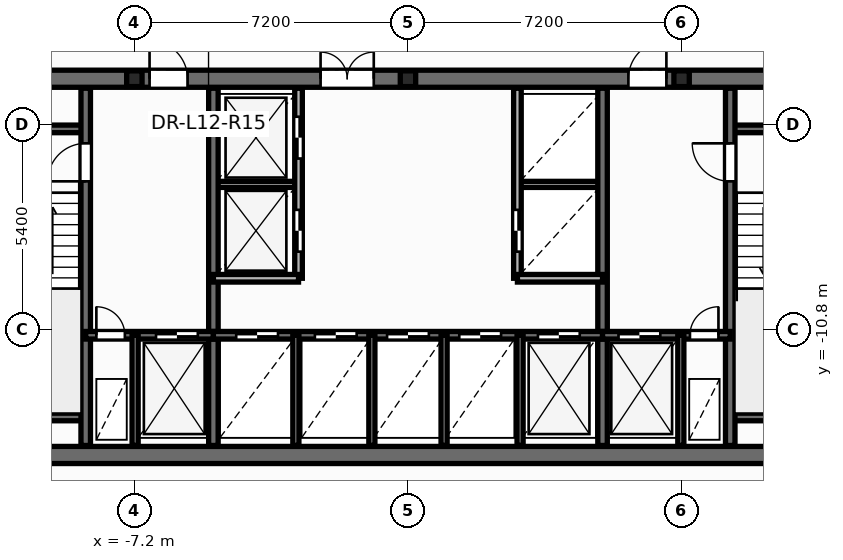
"""IFC4 building model, lengths in metres.
Left out: names, types, materials, properties, quantities, classifications, styles, units other than length and angle.
Written with IfcOpenShell. Run it as: python <this file> out.ifc"""

import sys

from ifc_helpers import new_model, si_unit, direction, frame, frame_2d, origin, origin_2d, place, context, subcontext, project, spatial, rectangle, i_section, extrude, element, fill, save


model = new_model("IFC4")
c1 = context("Model", 3, precision=1e-05, world=origin(), true_north=direction((0.0, 1.0)))
c2 = subcontext(c1, "Body", "Model", "MODEL_VIEW")
j1 = project(units=[si_unit("LENGTHUNIT", "METRE"), si_unit("PLANEANGLEUNIT", "RADIAN")], contexts=[c1])
p1 = place(None, origin())
s1 = spatial("IfcSite", under=j1, at=p1, CompositionType="ELEMENT")
p2 = place(p1, origin())
s2 = spatial("IfcBuilding", under=s1, at=p2, CompositionType="ELEMENT")
p3 = place(p2, frame((0.0, 0.0, 49.5)))
s3 = spatial("IfcBuildingStorey", under=s2, at=p3, CompositionType="ELEMENT", Elevation=49.5)
for number, where, z_axis, x_axis in (
    (1, (-7.2, -4.2, 0.0), (0.0, 0.0, 1.0), (1.0, 0.0, 0.0)),
    (2, (0.0, -4.2, 0.0), (0.0, 0.0, 1.0), (1.0, 0.0, 0.0)),
    (3, (7.2, -4.2, 0.0), (0.0, 0.0, 1.0), (1.0, 0.0, 0.0)),
):
    element("IfcColumn", number, at=place(p3, frame(where, z_axis=z_axis, x_axis=x_axis)), inside=s3, PredefinedType="PILASTER", context=c2, shape_type="SweptSolid", body=[
        extrude(i_section(OverallWidth=0.405, OverallDepth=0.414, WebThickness=0.022, FlangeThickness=0.032, at=origin_2d()), origin(), (0.0, 0.0, 1.0), 3.6),
    ])
for number, where, z_axis, x_axis in (
    (4, (-5.12, -6.98, 0.0), (0.0, 0.0, 1.0), (1.0, 0.0, 0.0)),
    (5, (2.88, -6.98, 0.0), (0.0, 0.0, 1.0), (1.0, 0.0, 0.0)),
):
    element("IfcWall", number, at=place(p3, frame(where, z_axis=z_axis, x_axis=x_axis)), inside=s3, PredefinedType="PARTITIONING", context=c2, shape_type="SweptSolid", body=[
        extrude(rectangle(XDim=2.24, YDim=0.16, at=frame_2d((1.12, 0.0))), origin(), (0.0, 0.0, 1.0), 3.35),
    ])
p4 = place(p3, frame((-12.65, -14.1, 0.0), z_axis=(0.0, 0.0, 1.0), x_axis=(1.0, 0.0, 0.0)))
e6 = element("IfcWall", 6, at=p4, inside=s3, PredefinedType="SHEAR", context=c2, shape_type="SweptSolid", body=[
    extrude(rectangle(XDim=25.3, YDim=0.45, at=frame_2d((12.65, 0.0))), origin(), (0.0, 0.0, 1.0), 3.6),
])
p5 = place(p3, frame((-12.65, -4.2, 0.0), z_axis=(0.0, 0.0, 1.0), x_axis=(1.0, 0.0, 0.0)))
e7 = element("IfcWall", 7, at=p5, inside=s3, PredefinedType="SHEAR", context=c2, shape_type="SweptSolid", body=[
    extrude(rectangle(XDim=25.3, YDim=0.45, at=frame_2d((12.65, 0.0))), origin(), (0.0, 0.0, 1.0), 3.6),
])
p6 = place(p5, frame((1.85, 0.0, 0.0)))
e8 = element("IfcOpeningElement", 8, at=p6, cuts=e7, PredefinedType="OPENING", context=c2, shape_type="SweptSolid", body=[
    extrude(rectangle(XDim=0.756, YDim=2.054, at=frame_2d((0.375, 1.027))), frame((0.0, 0.235, 0.0), z_axis=(0.0, -1.0, 0.0), x_axis=(1.0, 0.0, 0.0)), (0.0, 0.0, 1.0), 0.47),
])
p7 = place(p5, frame((22.65, 0.0, 0.0)))
e9 = element("IfcOpeningElement", 9, at=p7, cuts=e7, PredefinedType="OPENING", context=c2, shape_type="SweptSolid", body=[
    extrude(rectangle(XDim=0.756, YDim=2.054, at=frame_2d((0.375, 1.027))), frame((0.0, 0.235, 0.0), z_axis=(0.0, -1.0, 0.0), x_axis=(1.0, 0.0, 0.0)), (0.0, 0.0, 1.0), 0.47),
])
p8 = place(p5, frame((5.85, 0.0, 0.0)))
e10 = element("IfcOpeningElement", 10, at=p8, cuts=e7, PredefinedType="OPENING", context=c2, shape_type="SweptSolid", body=[
    extrude(rectangle(XDim=1.006, YDim=2.104, at=frame_2d((0.5, 1.052))), frame((0.0, 0.235, 0.0), z_axis=(0.0, -1.0, 0.0), x_axis=(1.0, 0.0, 0.0)), (0.0, 0.0, 1.0), 0.47),
])
p9 = place(p5, frame((10.35, 0.0, 0.0)))
e11 = element("IfcOpeningElement", 11, at=p9, cuts=e7, PredefinedType="OPENING", context=c2, shape_type="SweptSolid", body=[
    extrude(rectangle(XDim=1.406, YDim=2.154, at=frame_2d((0.7, 1.077))), frame((0.0, 0.235, 0.0), z_axis=(0.0, -1.0, 0.0), x_axis=(1.0, 0.0, 0.0)), (0.0, 0.0, 1.0), 0.47),
])
p10 = place(p5, frame((18.45, 0.0, 0.0)))
e12 = element("IfcOpeningElement", 12, at=p10, cuts=e7, PredefinedType="OPENING", context=c2, shape_type="SweptSolid", body=[
    extrude(rectangle(XDim=1.006, YDim=2.104, at=frame_2d((0.5, 1.052))), frame((0.0, 0.235, 0.0), z_axis=(0.0, -1.0, 0.0), x_axis=(1.0, 0.0, 0.0)), (0.0, 0.0, 1.0), 0.47),
])
for number, where, z_axis, x_axis in (
    (13, (-12.35, -5.52, 0.0), (0.0, 0.0, 1.0), (1.0, 0.0, 0.0)),
    (14, (-12.35, -13.1, 0.0), (0.0, 0.0, 1.0), (1.0, 0.0, 0.0)),
    (15, (8.48, -5.52, 0.0), (0.0, 0.0, 1.0), (1.0, 0.0, 0.0)),
    (16, (8.48, -13.1, 0.0), (0.0, 0.0, 1.0), (1.0, 0.0, 0.0)),
):
    element("IfcWall", number, at=place(p3, frame(where, z_axis=z_axis, x_axis=x_axis)), inside=s3, PredefinedType="SOLIDWALL", context=c2, shape_type="SweptSolid", body=[
        extrude(rectangle(XDim=3.87, YDim=0.2, at=frame_2d((1.935, 0.0))), origin(), (0.0, 0.0, 1.0), 3.6),
    ])
p11 = place(p3, frame((-8.48, -13.85, 0.0), z_axis=(0.0, 0.0, 1.0), x_axis=(0.0, 1.0, 0.0)))
e17 = element("IfcWall", 17, at=p11, inside=s3, PredefinedType="SHEAR", context=c2, shape_type="SweptSolid", body=[
    extrude(rectangle(XDim=9.4, YDim=0.25, at=frame_2d((4.7, 0.0))), origin(), (0.0, 0.0, 1.0), 3.6),
])
p12 = place(p11, frame((6.95, 0.0, 0.0)))
e18 = element("IfcOpeningElement", 18, at=p12, cuts=e17, PredefinedType="OPENING", context=c2, shape_type="SweptSolid", body=[
    extrude(rectangle(XDim=1.006, YDim=2.104, at=frame_2d((0.5, 1.052))), frame((0.0, 0.135, 0.0), z_axis=(0.0, -1.0, 0.0), x_axis=(1.0, 0.0, 0.0)), (0.0, 0.0, 1.0), 0.27),
])
p13 = place(p3, frame((8.48, -13.85, 0.0), z_axis=(0.0, 0.0, 1.0), x_axis=(0.0, 1.0, 0.0)))
e19 = element("IfcWall", 19, at=p13, inside=s3, PredefinedType="SHEAR", context=c2, shape_type="SweptSolid", body=[
    extrude(rectangle(XDim=9.4, YDim=0.25, at=frame_2d((4.7, 0.0))), origin(), (0.0, 0.0, 1.0), 3.6),
])
p14 = place(p13, frame((6.95, 0.0, 0.0)))
e20 = element("IfcOpeningElement", 20, at=p14, cuts=e19, PredefinedType="OPENING", context=c2, shape_type="SweptSolid", body=[
    extrude(rectangle(XDim=1.006, YDim=2.104, at=frame_2d((0.5, 1.052))), frame((0.0, 0.135, 0.0), z_axis=(0.0, -1.0, 0.0), x_axis=(1.0, 0.0, 0.0)), (0.0, 0.0, 1.0), 0.27),
])
for number, where, z_axis, x_axis in (
    (21, (-5.12, -13.85, 0.0), (0.0, 0.0, 1.0), (0.0, 1.0, 0.0)),
    (22, (5.12, -13.85, 0.0), (0.0, 0.0, 1.0), (0.0, 1.0, 0.0)),
):
    element("IfcWall", number, at=place(p3, frame(where, z_axis=z_axis, x_axis=x_axis)), inside=s3, PredefinedType="SHEAR", context=c2, shape_type="SweptSolid", body=[
        extrude(rectangle(XDim=9.4, YDim=0.25, at=frame_2d((4.7, 0.0))), origin(), (0.0, 0.0, 1.0), 3.6),
    ])
p15 = place(p3, frame((-8.48, -10.95, 0.0), z_axis=(0.0, 0.0, 1.0), x_axis=(1.0, 0.0, 0.0)))
e23 = element("IfcWall", 23, at=p15, inside=s3, PredefinedType="SOLIDWALL", context=c2, shape_type="SweptSolid", body=[
    extrude(rectangle(XDim=3.36, YDim=0.2, at=frame_2d((1.68, 0.0))), origin(), (0.0, 0.0, 1.0), 3.6),
])
p16 = place(p15, frame((0.28, 0.0, 0.0)))
e24 = element("IfcOpeningElement", 24, at=p16, cuts=e23, PredefinedType="OPENING", context=c2, shape_type="SweptSolid", body=[
    extrude(rectangle(XDim=0.756, YDim=2.054, at=frame_2d((0.375, 1.027))), frame((0.0, 0.11, 0.0), z_axis=(0.0, -1.0, 0.0), x_axis=(1.0, 0.0, 0.0)), (0.0, 0.0, 1.0), 0.22),
])
p17 = place(p15, frame((1.85, 0.0, 0.0)))
e25 = element("IfcOpeningElement", 25, at=p17, cuts=e23, PredefinedType="OPENING", context=c2, shape_type="SweptSolid", body=[
    extrude(rectangle(XDim=1.106, YDim=2.104, at=frame_2d((0.55, 1.052))), frame((0.0, 0.11, 0.0), z_axis=(0.0, -1.0, 0.0), x_axis=(1.0, 0.0, 0.0)), (0.0, 0.0, 1.0), 0.22),
])
p18 = place(p3, frame((-5.12, -10.95, 0.0), z_axis=(0.0, 0.0, 1.0), x_axis=(1.0, 0.0, 0.0)))
e26 = element("IfcWall", 26, at=p18, inside=s3, PredefinedType="SOLIDWALL", context=c2, shape_type="SweptSolid", body=[
    extrude(rectangle(XDim=10.24, YDim=0.2, at=frame_2d((5.12, 0.0))), origin(), (0.0, 0.0, 1.0), 3.6),
])
p19 = place(p18, frame((0.6, 0.0, 0.0)))
e27 = element("IfcOpeningElement", 27, at=p19, cuts=e26, PredefinedType="OPENING", context=c2, shape_type="SweptSolid", body=[
    extrude(rectangle(XDim=1.106, YDim=2.104, at=frame_2d((0.55, 1.052))), frame((0.0, 0.11, 0.0), z_axis=(0.0, -1.0, 0.0), x_axis=(1.0, 0.0, 0.0)), (0.0, 0.0, 1.0), 0.22),
])
p20 = place(p18, frame((2.67, 0.0, 0.0)))
e28 = element("IfcOpeningElement", 28, at=p20, cuts=e26, PredefinedType="OPENING", context=c2, shape_type="SweptSolid", body=[
    extrude(rectangle(XDim=1.106, YDim=2.104, at=frame_2d((0.55, 1.052))), frame((0.0, 0.11, 0.0), z_axis=(0.0, -1.0, 0.0), x_axis=(1.0, 0.0, 0.0)), (0.0, 0.0, 1.0), 0.22),
])
p21 = place(p18, frame((4.57, 0.0, 0.0)))
e29 = element("IfcOpeningElement", 29, at=p21, cuts=e26, PredefinedType="OPENING", context=c2, shape_type="SweptSolid", body=[
    extrude(rectangle(XDim=1.106, YDim=2.104, at=frame_2d((0.55, 1.052))), frame((0.0, 0.11, 0.0), z_axis=(0.0, -1.0, 0.0), x_axis=(1.0, 0.0, 0.0)), (0.0, 0.0, 1.0), 0.22),
])
p22 = place(p18, frame((6.47, 0.0, 0.0)))
e30 = element("IfcOpeningElement", 30, at=p22, cuts=e26, PredefinedType="OPENING", context=c2, shape_type="SweptSolid", body=[
    extrude(rectangle(XDim=1.106, YDim=2.104, at=frame_2d((0.55, 1.052))), frame((0.0, 0.11, 0.0), z_axis=(0.0, -1.0, 0.0), x_axis=(1.0, 0.0, 0.0)), (0.0, 0.0, 1.0), 0.22),
])
p23 = place(p18, frame((8.54, 0.0, 0.0)))
e31 = element("IfcOpeningElement", 31, at=p23, cuts=e26, PredefinedType="OPENING", context=c2, shape_type="SweptSolid", body=[
    extrude(rectangle(XDim=1.106, YDim=2.104, at=frame_2d((0.55, 1.052))), frame((0.0, 0.11, 0.0), z_axis=(0.0, -1.0, 0.0), x_axis=(1.0, 0.0, 0.0)), (0.0, 0.0, 1.0), 0.22),
])
p24 = place(p3, frame((5.12, -10.95, 0.0), z_axis=(0.0, 0.0, 1.0), x_axis=(1.0, 0.0, 0.0)))
e32 = element("IfcWall", 32, at=p24, inside=s3, PredefinedType="SOLIDWALL", context=c2, shape_type="SweptSolid", body=[
    extrude(rectangle(XDim=3.36, YDim=0.2, at=frame_2d((1.68, 0.0))), origin(), (0.0, 0.0, 1.0), 3.6),
])
p25 = place(p24, frame((0.42, 0.0, 0.0)))
e33 = element("IfcOpeningElement", 33, at=p25, cuts=e32, PredefinedType="OPENING", context=c2, shape_type="SweptSolid", body=[
    extrude(rectangle(XDim=1.106, YDim=2.104, at=frame_2d((0.55, 1.052))), frame((0.0, 0.11, 0.0), z_axis=(0.0, -1.0, 0.0), x_axis=(1.0, 0.0, 0.0)), (0.0, 0.0, 1.0), 0.22),
])
p26 = place(p24, frame((2.3, 0.0, 0.0)))
e34 = element("IfcOpeningElement", 34, at=p26, cuts=e32, PredefinedType="OPENING", context=c2, shape_type="SweptSolid", body=[
    extrude(rectangle(XDim=0.756, YDim=2.054, at=frame_2d((0.375, 1.027))), frame((0.0, 0.11, 0.0), z_axis=(0.0, -1.0, 0.0), x_axis=(1.0, 0.0, 0.0)), (0.0, 0.0, 1.0), 0.22),
])
for number, where, z_axis, x_axis in (
    (35, (-7.18, -13.85, 0.0), (0.0, 0.0, 1.0), (0.0, 1.0, 0.0)),
    (36, (7.18, -13.85, 0.0), (0.0, 0.0, 1.0), (0.0, 1.0, 0.0)),
    (37, (-2.95, -13.85, 0.0), (0.0, 0.0, 1.0), (0.0, 1.0, 0.0)),
    (38, (2.95, -13.85, 0.0), (0.0, 0.0, 1.0), (0.0, 1.0, 0.0)),
):
    element("IfcWall", number, at=place(p3, frame(where, z_axis=z_axis, x_axis=x_axis)), inside=s3, PredefinedType="PARTITIONING", context=c2, shape_type="SweptSolid", body=[
        extrude(rectangle(XDim=2.9, YDim=0.16, at=frame_2d((1.45, 0.0))), origin(), (0.0, 0.0, 1.0), 2.375),
    ])
p27 = place(p3, frame((-2.88, -9.45, 0.0), z_axis=(0.0, 0.0, 1.0), x_axis=(0.0, 1.0, 0.0)))
e39 = element("IfcWall", 39, at=p27, inside=s3, PredefinedType="SOLIDWALL", context=c2, shape_type="SweptSolid", body=[
    extrude(rectangle(XDim=5.0, YDim=0.2, at=frame_2d((2.5, 0.0))), origin(), (0.0, 0.0, 1.0), 3.35),
])
p28 = place(p27, frame((0.7, 0.0, 0.0)))
e40 = element("IfcOpeningElement", 40, at=p28, cuts=e39, PredefinedType="OPENING", context=c2, shape_type="SweptSolid", body=[
    extrude(rectangle(XDim=1.106, YDim=2.104, at=frame_2d((0.55, 1.052))), frame((0.0, 0.11, 0.0), z_axis=(0.0, -1.0, 0.0), x_axis=(1.0, 0.0, 0.0)), (0.0, 0.0, 1.0), 0.22),
])
p29 = place(p27, frame((3.15, 0.0, 0.0)))
e41 = element("IfcOpeningElement", 41, at=p29, cuts=e39, PredefinedType="OPENING", context=c2, shape_type="SweptSolid", body=[
    extrude(rectangle(XDim=1.106, YDim=2.104, at=frame_2d((0.55, 1.052))), frame((0.0, 0.11, 0.0), z_axis=(0.0, -1.0, 0.0), x_axis=(1.0, 0.0, 0.0)), (0.0, 0.0, 1.0), 0.22),
])
p30 = place(p3, frame((-5.12, -9.45, 0.0), z_axis=(0.0, 0.0, 1.0), x_axis=(1.0, 0.0, 0.0)))
e42 = element("IfcWall", 42, at=p30, inside=s3, PredefinedType="SOLIDWALL", context=c2, shape_type="SweptSolid", body=[
    extrude(rectangle(XDim=2.24, YDim=0.2, at=frame_2d((1.12, 0.0))), origin(), (0.0, 0.0, 1.0), 3.35),
])
p31 = place(p3, frame((2.88, -9.45, 0.0), z_axis=(0.0, 0.0, 1.0), x_axis=(0.0, 1.0, 0.0)))
e43 = element("IfcWall", 43, at=p31, inside=s3, PredefinedType="SOLIDWALL", context=c2, shape_type="SweptSolid", body=[
    extrude(rectangle(XDim=5.0, YDim=0.2, at=frame_2d((2.5, 0.0))), origin(), (0.0, 0.0, 1.0), 3.35),
])
p32 = place(p31, frame((0.7, 0.0, 0.0)))
e44 = element("IfcOpeningElement", 44, at=p32, cuts=e43, PredefinedType="OPENING", context=c2, shape_type="SweptSolid", body=[
    extrude(rectangle(XDim=1.106, YDim=2.104, at=frame_2d((0.55, 1.052))), frame((0.0, 0.11, 0.0), z_axis=(0.0, -1.0, 0.0), x_axis=(1.0, 0.0, 0.0)), (0.0, 0.0, 1.0), 0.22),
])
p33 = place(p3, frame((2.88, -9.45, 0.0), z_axis=(0.0, 0.0, 1.0), x_axis=(1.0, 0.0, 0.0)))
e45 = element("IfcWall", 45, at=p33, inside=s3, PredefinedType="SOLIDWALL", context=c2, shape_type="SweptSolid", body=[
    extrude(rectangle(XDim=2.24, YDim=0.2, at=frame_2d((1.12, 0.0))), origin(), (0.0, 0.0, 1.0), 3.35),
])
for number, where, z_axis, x_axis in (
    (46, (-0.95, -13.85, 0.0), (0.0, 0.0, 1.0), (0.0, 1.0, 0.0)),
    (47, (0.95, -13.85, 0.0), (0.0, 0.0, 1.0), (0.0, 1.0, 0.0)),
):
    element("IfcWall", number, at=place(p3, frame(where, z_axis=z_axis, x_axis=x_axis)), inside=s3, PredefinedType="PARTITIONING", context=c2, shape_type="SweptSolid", body=[
        extrude(rectangle(XDim=2.9, YDim=0.16, at=frame_2d((1.45, 0.0))), origin(), (0.0, 0.0, 1.0), 2.375),
    ])
p34 = place(p28, origin())
e48 = element("IfcDoor", 48, at=p34, inside=s3, OperationType="DOUBLE_DOOR_SLIDING", PredefinedType="DOOR", context=c2, shape_type="SweptSolid", body=[
    extrude(rectangle(XDim=1.1, YDim=2.1, at=frame_2d((0.55, 1.05))), frame((0.0, 0.025, 0.0), z_axis=(0.0, -1.0, 0.0), x_axis=(1.0, 0.0, 0.0)), (0.0, 0.0, 1.0), 0.05),
])
fill(e40, e48)
p35 = place(p29, origin())
e49 = element("IfcDoor", 49, at=p35, inside=s3, OperationType="DOUBLE_DOOR_SLIDING", PredefinedType="DOOR", context=c2, shape_type="SweptSolid", body=[
    extrude(rectangle(XDim=1.1, YDim=2.1, at=frame_2d((0.55, 1.05))), frame((0.0, 0.025, 0.0), z_axis=(0.0, -1.0, 0.0), x_axis=(1.0, 0.0, 0.0)), (0.0, 0.0, 1.0), 0.05),
])
fill(e41, e49)
p36 = place(p32, origin())
e50 = element("IfcDoor", 50, at=p36, inside=s3, OperationType="DOUBLE_DOOR_SLIDING", PredefinedType="DOOR", context=c2, shape_type="SweptSolid", body=[
    extrude(rectangle(XDim=1.1, YDim=2.1, at=frame_2d((0.55, 1.05))), frame((0.0, 0.025, 0.0), z_axis=(0.0, -1.0, 0.0), x_axis=(1.0, 0.0, 0.0)), (0.0, 0.0, 1.0), 0.05),
])
fill(e44, e50)
p37 = place(p12, origin())
e51 = element("IfcDoor", 51, at=p37, inside=s3, OperationType="SINGLE_SWING_LEFT", PredefinedType="DOOR", context=c2, shape_type="SweptSolid", body=[
    extrude(rectangle(XDim=1.0, YDim=2.1, at=frame_2d((0.5, 1.05))), frame((0.0, 0.025, 0.0), z_axis=(0.0, -1.0, 0.0), x_axis=(1.0, 0.0, 0.0)), (0.0, 0.0, 1.0), 0.05),
])
fill(e18, e51)
p38 = place(p14, origin())
e52 = element("IfcDoor", 52, at=p38, inside=s3, OperationType="SINGLE_SWING_RIGHT", PredefinedType="DOOR", context=c2, shape_type="SweptSolid", body=[
    extrude(rectangle(XDim=1.0, YDim=2.1, at=frame_2d((0.5, 1.05))), frame((0.0, 0.025, 0.0), z_axis=(0.0, -1.0, 0.0), x_axis=(1.0, 0.0, 0.0)), (0.0, 0.0, 1.0), 0.05),
])
fill(e20, e52)
p39 = place(p16, origin())
e53 = element("IfcDoor", 53, at=p39, inside=s3, OperationType="SINGLE_SWING_LEFT", PredefinedType="DOOR", context=c2, shape_type="SweptSolid", body=[
    extrude(rectangle(XDim=0.75, YDim=2.05, at=frame_2d((0.375, 1.025))), frame((0.0, 0.025, 0.0), z_axis=(0.0, -1.0, 0.0), x_axis=(1.0, 0.0, 0.0)), (0.0, 0.0, 1.0), 0.05),
])
fill(e24, e53)
p40 = place(p17, origin())
e54 = element("IfcDoor", 54, at=p40, inside=s3, OperationType="DOUBLE_DOOR_SLIDING", PredefinedType="DOOR", context=c2, shape_type="SweptSolid", body=[
    extrude(rectangle(XDim=1.1, YDim=2.1, at=frame_2d((0.55, 1.05))), frame((0.0, 0.025, 0.0), z_axis=(0.0, -1.0, 0.0), x_axis=(1.0, 0.0, 0.0)), (0.0, 0.0, 1.0), 0.05),
])
fill(e25, e54)
p41 = place(p25, origin())
e55 = element("IfcDoor", 55, at=p41, inside=s3, OperationType="DOUBLE_DOOR_SLIDING", PredefinedType="DOOR", context=c2, shape_type="SweptSolid", body=[
    extrude(rectangle(XDim=1.1, YDim=2.1, at=frame_2d((0.55, 1.05))), frame((0.0, 0.025, 0.0), z_axis=(0.0, -1.0, 0.0), x_axis=(1.0, 0.0, 0.0)), (0.0, 0.0, 1.0), 0.05),
])
fill(e33, e55)
p42 = place(p26, origin())
e56 = element("IfcDoor", 56, at=p42, inside=s3, OperationType="SINGLE_SWING_RIGHT", PredefinedType="DOOR", context=c2, shape_type="SweptSolid", body=[
    extrude(rectangle(XDim=0.75, YDim=2.05, at=frame_2d((0.375, 1.025))), frame((0.0, 0.025, 0.0), z_axis=(0.0, -1.0, 0.0), x_axis=(1.0, 0.0, 0.0)), (0.0, 0.0, 1.0), 0.05),
])
fill(e34, e56)
p43 = place(p19, origin())
e57 = element("IfcDoor", 57, at=p43, inside=s3, OperationType="DOUBLE_DOOR_SLIDING", PredefinedType="DOOR", context=c2, shape_type="SweptSolid", body=[
    extrude(rectangle(XDim=1.1, YDim=2.1, at=frame_2d((0.55, 1.05))), frame((0.0, 0.025, 0.0), z_axis=(0.0, -1.0, 0.0), x_axis=(1.0, 0.0, 0.0)), (0.0, 0.0, 1.0), 0.05),
])
fill(e27, e57)
p44 = place(p20, origin())
e58 = element("IfcDoor", 58, at=p44, inside=s3, OperationType="DOUBLE_DOOR_SLIDING", PredefinedType="DOOR", context=c2, shape_type="SweptSolid", body=[
    extrude(rectangle(XDim=1.1, YDim=2.1, at=frame_2d((0.55, 1.05))), frame((0.0, 0.025, 0.0), z_axis=(0.0, -1.0, 0.0), x_axis=(1.0, 0.0, 0.0)), (0.0, 0.0, 1.0), 0.05),
])
fill(e28, e58)
p45 = place(p21, origin())
e59 = element("IfcDoor", 59, at=p45, inside=s3, OperationType="DOUBLE_DOOR_SLIDING", PredefinedType="DOOR", context=c2, shape_type="SweptSolid", body=[
    extrude(rectangle(XDim=1.1, YDim=2.1, at=frame_2d((0.55, 1.05))), frame((0.0, 0.025, 0.0), z_axis=(0.0, -1.0, 0.0), x_axis=(1.0, 0.0, 0.0)), (0.0, 0.0, 1.0), 0.05),
])
fill(e29, e59)
p46 = place(p22, origin())
e60 = element("IfcDoor", 60, at=p46, inside=s3, OperationType="DOUBLE_DOOR_SLIDING", PredefinedType="DOOR", context=c2, shape_type="SweptSolid", body=[
    extrude(rectangle(XDim=1.1, YDim=2.1, at=frame_2d((0.55, 1.05))), frame((0.0, 0.025, 0.0), z_axis=(0.0, -1.0, 0.0), x_axis=(1.0, 0.0, 0.0)), (0.0, 0.0, 1.0), 0.05),
])
fill(e30, e60)
p47 = place(p23, origin())
e61 = element("IfcDoor", 61, at=p47, inside=s3, OperationType="DOUBLE_DOOR_SLIDING", PredefinedType="DOOR", context=c2, shape_type="SweptSolid", body=[
    extrude(rectangle(XDim=1.1, YDim=2.1, at=frame_2d((0.55, 1.05))), frame((0.0, 0.025, 0.0), z_axis=(0.0, -1.0, 0.0), x_axis=(1.0, 0.0, 0.0)), (0.0, 0.0, 1.0), 0.05),
])
fill(e31, e61)
p48 = place(p8, origin())
e62 = element("IfcDoor", 62, at=p48, inside=s3, OperationType="SINGLE_SWING_LEFT", PredefinedType="DOOR", context=c2, shape_type="SweptSolid", body=[
    extrude(rectangle(XDim=1.0, YDim=2.1, at=frame_2d((0.5, 1.05))), frame((0.0, 0.025, 0.0), z_axis=(0.0, -1.0, 0.0), x_axis=(1.0, 0.0, 0.0)), (0.0, 0.0, 1.0), 0.05),
])
fill(e10, e62)
p49 = place(p9, origin())
e63 = element("IfcDoor", 63, at=p49, inside=s3, OperationType="DOUBLE_DOOR_SINGLE_SWING", PredefinedType="DOOR", context=c2, shape_type="SweptSolid", body=[
    extrude(rectangle(XDim=1.4, YDim=2.15, at=frame_2d((0.7, 1.075))), frame((0.0, 0.025, 0.0), z_axis=(0.0, -1.0, 0.0), x_axis=(1.0, 0.0, 0.0)), (0.0, 0.0, 1.0), 0.05),
])
fill(e11, e63)
p50 = place(p10, origin())
e64 = element("IfcDoor", 64, at=p50, inside=s3, OperationType="SINGLE_SWING_RIGHT", PredefinedType="DOOR", context=c2, shape_type="SweptSolid", body=[
    extrude(rectangle(XDim=1.0, YDim=2.1, at=frame_2d((0.5, 1.05))), frame((0.0, 0.025, 0.0), z_axis=(0.0, -1.0, 0.0), x_axis=(1.0, 0.0, 0.0)), (0.0, 0.0, 1.0), 0.05),
])
fill(e12, e64)
save(model, sys.argv[1])
